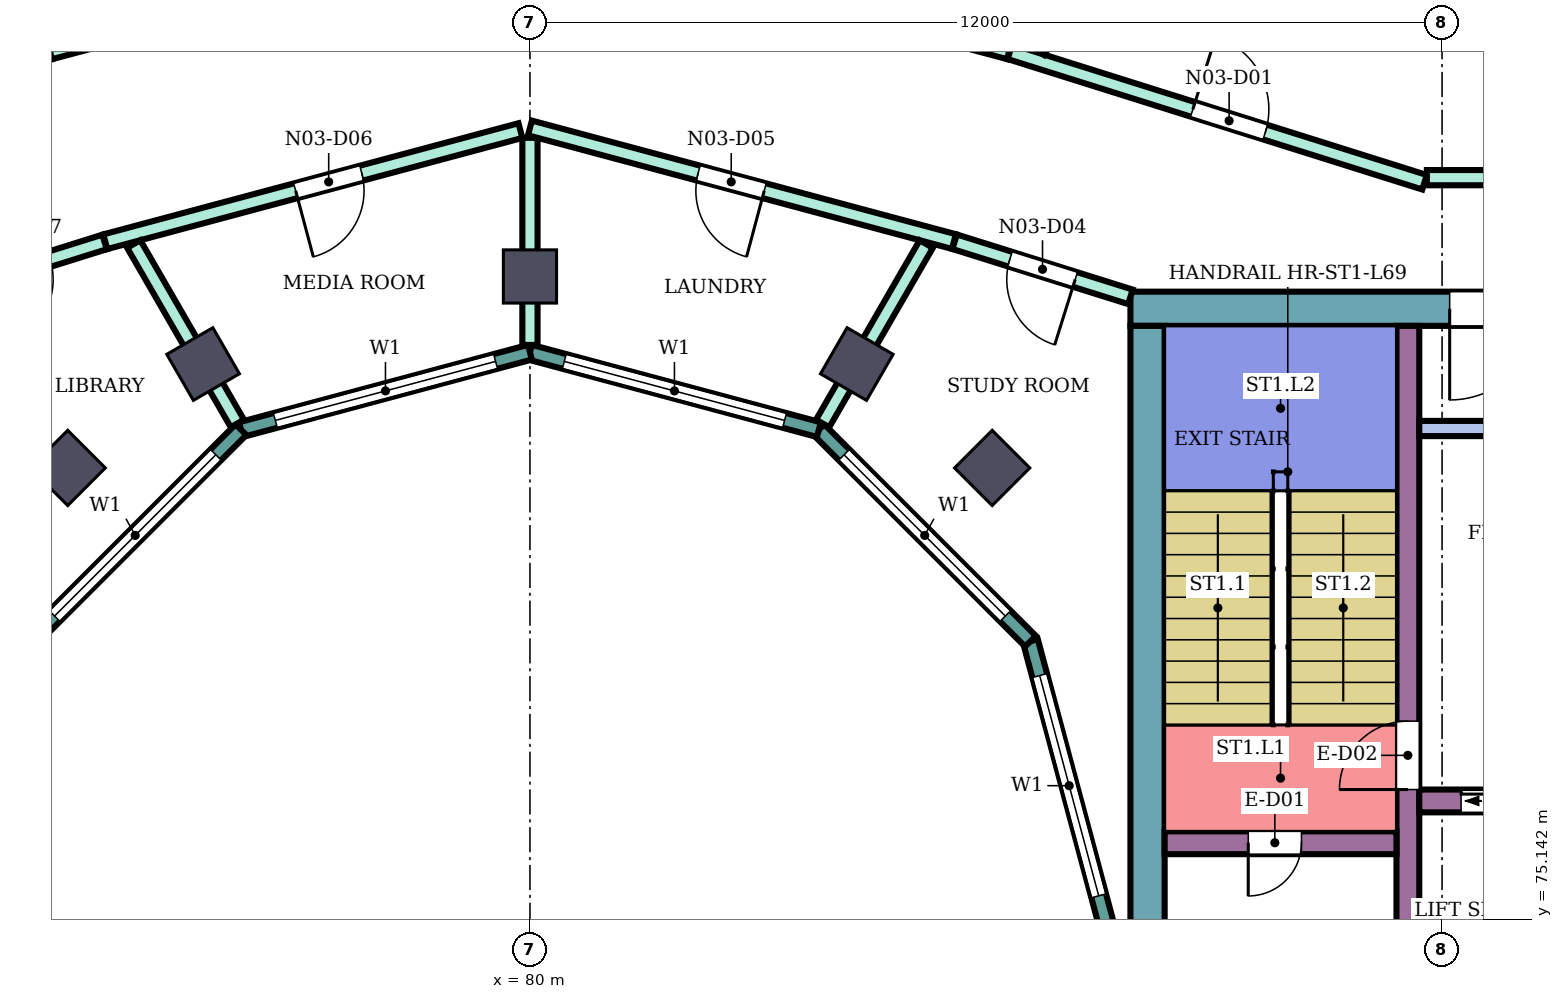
"""IFC4 building model, lengths in metres.
Left out: names, types, materials, properties, quantities, classifications, styles, units other than length and angle.
Written with IfcOpenShell. Run it as: python <this file> out.ifc"""

import sys

from ifc_helpers import new_model, si_unit, direction, frame, frame_2d, origin, origin_2d, place, context, subcontext, project, spatial, rectangle, extrude, element, fill, save


model = new_model("IFC4")
c1 = context("Model", 3, precision=1e-05, world=origin(), true_north=direction((0.0, 1.0)))
c2 = subcontext(c1, "Body", "Model", "MODEL_VIEW")
j1 = project(units=[si_unit("LENGTHUNIT", "METRE"), si_unit("PLANEANGLEUNIT", "RADIAN")], contexts=[c1])
p1 = place(None, origin())
s1 = spatial("IfcSite", under=j1, at=p1, CompositionType="ELEMENT")
p2 = place(p1, origin())
s2 = spatial("IfcBuilding", under=s1, at=p2, CompositionType="ELEMENT")
p3 = place(p2, frame((0.0, 0.0, 300.9)))
s3 = spatial("IfcBuildingStorey", under=s2, at=p3, CompositionType="ELEMENT", Elevation=300.9)
for number, where, z_axis, x_axis in (
    (1, (86.081, 81.081, 0.0), (0.0, 0.0, 1.0), (0.707, 0.707, 0.0)),
    (2, (84.3, 82.448, 0.0), (0.0, 0.0, 1.0), (0.5, 0.866, 0.0)),
    (3, (80.0, 83.6, 0.0), (0.0, 0.0, 1.0), (0.0, 1.0, 0.0)),
    (4, (75.7, 82.448, 0.0), (0.0, 0.0, 1.0), (-0.5, 0.866, 0.0)),
    (5, (73.919, 81.081, 0.0), (0.0, 0.0, 1.0), (-0.707, 0.707, 0.0)),
):
    element("IfcColumn", number, at=place(p3, frame(where, z_axis=z_axis, x_axis=x_axis)), inside=s3, PredefinedType="COLUMN", context=c2, shape_type="SweptSolid", body=[
        extrude(rectangle(XDim=0.7, YDim=0.7, at=origin_2d()), origin(), (0.0, 0.0, 1.0), 4.2),
    ])
p4 = place(p3, frame((87.9, 83.175, 0.0), z_axis=(0.0, 0.0, 1.0), x_axis=(1.0, 0.0, 0.0)))
e6 = element("IfcWall", 6, at=p4, inside=s3, PredefinedType="SHEAR", context=c2, shape_type="SweptSolid", body=[
    extrude(rectangle(XDim=12.0, YDim=0.45, at=frame_2d((6.0, 0.0))), origin(), (0.0, 0.0, 1.0), 3.88),
])
p5 = place(p4, frame((4.2, 0.0, 0.0)))
e7 = element("IfcOpeningElement", 7, at=p5, cuts=e6, PredefinedType="OPENING", context=c2, shape_type="SweptSolid", body=[
    extrude(rectangle(XDim=2.4, YDim=2.4, at=frame_2d((1.2, 1.2))), frame((0.0, 0.235, 0.0), z_axis=(0.0, -1.0, 0.0), x_axis=(1.0, 0.0, 0.0)), (0.0, 0.0, 1.0), 0.47),
])
p6 = place(p3, frame((88.125, 75.0, 0.0), z_axis=(0.0, 0.0, 1.0), x_axis=(0.0, 1.0, 0.0)))
e8 = element("IfcWall", 8, at=p6, inside=s3, PredefinedType="SHEAR", context=c2, shape_type="SweptSolid", body=[
    extrude(rectangle(XDim=7.95, YDim=0.45, at=frame_2d((3.975, 0.0))), origin(), (0.0, 0.0, 1.0), 3.88),
])
p7 = place(p3, frame((91.55, 75.0, 0.0), z_axis=(0.0, 0.0, 1.0), x_axis=(0.0, 1.0, 0.0)))
e9 = element("IfcWall", 9, at=p7, inside=s3, PredefinedType="SHEAR", context=c2, shape_type="SweptSolid", body=[
    extrude(rectangle(XDim=7.95, YDim=0.3, at=frame_2d((3.975, 0.0))), origin(), (0.0, 0.0, 1.0), 3.88),
])
p8 = place(p7, frame((1.85, 0.0, 0.0)))
e10 = element("IfcOpeningElement", 10, at=p8, cuts=e9, PredefinedType="OPENING", context=c2, shape_type="SweptSolid", body=[
    extrude(rectangle(XDim=0.9, YDim=2.1, at=frame_2d((0.45, 1.05))), frame((0.0, 0.16, 0.0), z_axis=(0.0, -1.0, 0.0), x_axis=(1.0, 0.0, 0.0)), (0.0, 0.0, 1.0), 0.32),
])
p9 = place(p3, frame((88.35, 76.15, 0.0), z_axis=(0.0, 0.0, 1.0), x_axis=(1.0, 0.0, 0.0)))
e11 = element("IfcWall", 11, at=p9, inside=s3, PredefinedType="SHEAR", context=c2, shape_type="SweptSolid", body=[
    extrude(rectangle(XDim=3.05, YDim=0.3, at=frame_2d((1.525, 0.0))), origin(), (0.0, 0.0, 1.0), 3.88),
])
p10 = place(p9, frame((1.1, 0.0, 0.0)))
e12 = element("IfcOpeningElement", 12, at=p10, cuts=e11, PredefinedType="OPENING", context=c2, shape_type="SweptSolid", body=[
    extrude(rectangle(XDim=0.7, YDim=2.0, at=frame_2d((0.35, 1.0))), frame((0.0, 0.16, 0.0), z_axis=(0.0, -1.0, 0.0), x_axis=(1.0, 0.0, 0.0)), (0.0, 0.0, 1.0), 0.32),
])
p11 = place(p3, frame((91.7, 76.7, 0.0), z_axis=(0.0, 0.0, 1.0), x_axis=(1.0, 0.0, 0.0)))
e13 = element("IfcWall", 13, at=p11, inside=s3, PredefinedType="SHEAR", context=c2, shape_type="SweptSolid", body=[
    extrude(rectangle(XDim=7.75, YDim=0.3, at=frame_2d((3.875, 0.0))), origin(), (0.0, 0.0, 1.0), 3.88),
])
p12 = place(p11, frame((0.55, 0.0, 0.0)))
e14 = element("IfcOpeningElement", 14, at=p12, cuts=e13, PredefinedType="OPENING", context=c2, shape_type="SweptSolid", body=[
    extrude(rectangle(XDim=1.1, YDim=2.1, at=frame_2d((0.55, 1.05))), frame((0.0, 0.16, 0.0), z_axis=(0.0, -1.0, 0.0), x_axis=(1.0, 0.0, 0.0)), (0.0, 0.0, 1.0), 0.32),
])
p13 = place(p11, frame((3.0, 0.0, 0.0)))
e15 = element("IfcOpeningElement", 15, at=p13, cuts=e13, PredefinedType="OPENING", context=c2, shape_type="SweptSolid", body=[
    extrude(rectangle(XDim=1.2, YDim=2.1, at=frame_2d((0.6, 1.05))), frame((0.0, 0.16, 0.0), z_axis=(0.0, -1.0, 0.0), x_axis=(1.0, 0.0, 0.0)), (0.0, 0.0, 1.0), 0.32),
])
p14 = place(p11, frame((5.5, 0.0, 0.0)))
e16 = element("IfcOpeningElement", 16, at=p14, cuts=e13, PredefinedType="OPENING", context=c2, shape_type="SweptSolid", body=[
    extrude(rectangle(XDim=1.2, YDim=2.1, at=frame_2d((0.6, 1.05))), frame((0.0, 0.16, 0.0), z_axis=(0.0, -1.0, 0.0), x_axis=(1.0, 0.0, 0.0)), (0.0, 0.0, 1.0), 0.32),
])
p15 = place(p3, frame((91.7, 81.6, 0.0), z_axis=(0.0, 0.0, 1.0), x_axis=(1.0, 0.0, 0.0)))
e17 = element("IfcWall", 17, at=p15, inside=s3, PredefinedType="SHEAR", context=c2, shape_type="SweptSolid", body=[
    extrude(rectangle(XDim=4.15, YDim=0.2, at=frame_2d((2.075, 0.0))), origin(), (0.0, 0.0, 1.0), 3.88),
])
p16 = place(p3, frame((87.604, 75.0, 0.0), z_axis=(0.0, 0.0, 1.0), x_axis=(-0.258789828301, 0.965933654434, 0.0)))
e18 = element("IfcWall", 18, at=p16, inside=s3, PredefinedType="NOTDEFINED", context=c2, shape_type="SweptSolid", body=[
    extrude(rectangle(XDim=3.936, YDim=0.2, at=frame_2d((1.968, 0.0))), origin(), (0.0, 0.0, 1.0), 4.2),
])
p17 = place(p16, frame((0.468, 0.0, 0.9)))
e19 = element("IfcOpeningElement", 19, at=p17, cuts=e18, PredefinedType="OPENING", context=c2, shape_type="SweptSolid", body=[
    extrude(rectangle(XDim=3.0, YDim=2.3, at=frame_2d((1.5, 1.15))), frame((0.0, 0.11, 0.0), z_axis=(0.0, -1.0, 0.0), x_axis=(1.0, 0.0, 0.0)), (0.0, 0.0, 1.0), 0.22),
])
p18 = place(p3, frame((86.585, 78.802, 0.0), z_axis=(0.0, 0.0, 1.0), x_axis=(-0.707106781187, 0.707106781187, 0.0)))
e20 = element("IfcWall", 20, at=p18, inside=s3, PredefinedType="NOTDEFINED", context=c2, shape_type="SweptSolid", body=[
    extrude(rectangle(XDim=3.936, YDim=0.2, at=frame_2d((1.968, 0.0))), origin(), (0.0, 0.0, 1.0), 4.2),
])
p19 = place(p18, frame((0.468, 0.0, 0.9)))
e21 = element("IfcOpeningElement", 21, at=p19, cuts=e20, PredefinedType="OPENING", context=c2, shape_type="SweptSolid", body=[
    extrude(rectangle(XDim=3.0, YDim=2.3, at=frame_2d((1.5, 1.15))), frame((0.0, 0.11, 0.0), z_axis=(0.0, -1.0, 0.0), x_axis=(1.0, 0.0, 0.0)), (0.0, 0.0, 1.0), 0.22),
])
p20 = place(p3, frame((83.802, 81.585, 0.0), z_axis=(0.0, 0.0, 1.0), x_axis=(-0.965933654434, 0.258789828301, 0.0)))
e22 = element("IfcWall", 22, at=p20, inside=s3, PredefinedType="NOTDEFINED", context=c2, shape_type="SweptSolid", body=[
    extrude(rectangle(XDim=3.936, YDim=0.2, at=frame_2d((1.968, 0.0))), origin(), (0.0, 0.0, 1.0), 4.2),
])
p21 = place(p20, frame((0.468, 0.0, 0.9)))
e23 = element("IfcOpeningElement", 23, at=p21, cuts=e22, PredefinedType="OPENING", context=c2, shape_type="SweptSolid", body=[
    extrude(rectangle(XDim=3.0, YDim=2.3, at=frame_2d((1.5, 1.15))), frame((0.0, 0.11, 0.0), z_axis=(0.0, -1.0, 0.0), x_axis=(1.0, 0.0, 0.0)), (0.0, 0.0, 1.0), 0.22),
])
p22 = place(p3, frame((80.0, 82.604, 0.0), z_axis=(0.0, 0.0, 1.0), x_axis=(-0.965933654434, -0.258789828301, 0.0)))
e24 = element("IfcWall", 24, at=p22, inside=s3, PredefinedType="NOTDEFINED", context=c2, shape_type="SweptSolid", body=[
    extrude(rectangle(XDim=3.936, YDim=0.2, at=frame_2d((1.968, 0.0))), origin(), (0.0, 0.0, 1.0), 4.2),
])
p23 = place(p22, frame((0.468, 0.0, 0.9)))
e25 = element("IfcOpeningElement", 25, at=p23, cuts=e24, PredefinedType="OPENING", context=c2, shape_type="SweptSolid", body=[
    extrude(rectangle(XDim=3.0, YDim=2.3, at=frame_2d((1.5, 1.15))), frame((0.0, 0.11, 0.0), z_axis=(0.0, -1.0, 0.0), x_axis=(1.0, 0.0, 0.0)), (0.0, 0.0, 1.0), 0.22),
])
p24 = place(p3, frame((76.198, 81.585, 0.0), z_axis=(0.0, 0.0, 1.0), x_axis=(-0.707106781187, -0.707106781187, 0.0)))
e26 = element("IfcWall", 26, at=p24, inside=s3, PredefinedType="NOTDEFINED", context=c2, shape_type="SweptSolid", body=[
    extrude(rectangle(XDim=3.936, YDim=0.2, at=frame_2d((1.968, 0.0))), origin(), (0.0, 0.0, 1.0), 4.2),
])
p25 = place(p24, frame((0.468, 0.0, 0.9)))
e27 = element("IfcOpeningElement", 27, at=p25, cuts=e26, PredefinedType="OPENING", context=c2, shape_type="SweptSolid", body=[
    extrude(rectangle(XDim=3.0, YDim=2.3, at=frame_2d((1.5, 1.15))), frame((0.0, 0.11, 0.0), z_axis=(0.0, -1.0, 0.0), x_axis=(1.0, 0.0, 0.0)), (0.0, 0.0, 1.0), 0.22),
])
p26 = place(p3, frame((72.1, 83.332, 0.0), z_axis=(0.0, 0.0, 1.0), x_axis=(0.954233106619, 0.299063836383, 0.0)))
e28 = element("IfcWall", 28, at=p26, inside=s3, PredefinedType="PARTITIONING", context=c2, shape_type="SweptSolid", body=[
    extrude(rectangle(XDim=2.414, YDim=0.2, at=frame_2d((1.207, 0.0))), origin(), (0.0, 0.0, 1.0), 3.75),
])
p27 = place(p26, frame((0.762, 0.0, 0.0)))
e29 = element("IfcOpeningElement", 29, at=p27, cuts=e28, PredefinedType="OPENING", context=c2, shape_type="SweptSolid", body=[
    extrude(rectangle(XDim=0.9, YDim=2.1, at=frame_2d((0.45, 1.05))), frame((0.0, 0.11, 0.0), z_axis=(0.0, -1.0, 0.0), x_axis=(1.0, 0.0, 0.0)), (0.0, 0.0, 1.0), 0.22),
])
p28 = place(p3, frame((73.687, 86.555, 0.0), z_axis=(0.0, 0.0, 1.0), x_axis=(0.965987897826, 0.258587279759, 0.0)))
e30 = element("IfcWall", 30, at=p28, inside=s3, PredefinedType="PARTITIONING", context=c2, shape_type="SweptSolid", body=[
    extrude(rectangle(XDim=3.007, YDim=0.2, at=frame_2d((1.503, 0.0))), origin(), (0.0, 0.0, 1.0), 3.75),
])
p29 = place(p3, frame((74.413, 84.057, 0.0), z_axis=(0.0, 0.0, 1.0), x_axis=(0.965972135939, 0.258646153246, 0.0)))
e31 = element("IfcWall", 31, at=p29, inside=s3, PredefinedType="PARTITIONING", context=c2, shape_type="SweptSolid", body=[
    extrude(rectangle(XDim=5.654, YDim=0.2, at=frame_2d((2.827, 0.0))), origin(), (0.0, 0.0, 1.0), 3.75),
])
p30 = place(p29, frame((2.593, 0.0, 0.0)))
e32 = element("IfcOpeningElement", 32, at=p30, cuts=e31, PredefinedType="OPENING", context=c2, shape_type="SweptSolid", body=[
    extrude(rectangle(XDim=0.9, YDim=2.1, at=frame_2d((0.45, 1.05))), frame((0.0, 0.11, 0.0), z_axis=(0.0, -1.0, 0.0), x_axis=(1.0, 0.0, 0.0)), (0.0, 0.0, 1.0), 0.22),
])
p31 = place(p3, frame((74.787, 84.027, 0.0), z_axis=(0.0, 0.0, 1.0), x_axis=(0.500079107518, -0.86597972622, 0.0)))
e33 = element("IfcWall", 33, at=p31, inside=s3, PredefinedType="PARTITIONING", context=c2, shape_type="SweptSolid", body=[
    extrude(rectangle(XDim=2.726, YDim=0.2, at=frame_2d((1.363, 0.0))), origin(), (0.0, 0.0, 1.0), 3.75),
])
p32 = place(p3, frame((80.0, 82.699, 0.0), z_axis=(0.0, 0.0, 1.0), x_axis=(0.0, 1.0, 0.0)))
e34 = element("IfcWall", 34, at=p32, inside=s3, PredefinedType="PARTITIONING", context=c2, shape_type="SweptSolid", body=[
    extrude(rectangle(XDim=2.725, YDim=0.2, at=frame_2d((1.363, 0.0))), origin(), (0.0, 0.0, 1.0), 3.75),
])
p33 = place(p3, frame((80.0, 85.554, 0.0), z_axis=(0.0, 0.0, 1.0), x_axis=(0.965928989968, -0.258807237802, 0.0)))
e35 = element("IfcWall", 35, at=p33, inside=s3, PredefinedType="PARTITIONING", context=c2, shape_type="SweptSolid", body=[
    extrude(rectangle(XDim=5.774, YDim=0.2, at=frame_2d((2.887, 0.0))), origin(), (0.0, 0.0, 1.0), 3.75),
])
p34 = place(p33, frame((2.292, 0.0, 0.0)))
e36 = element("IfcOpeningElement", 36, at=p34, cuts=e35, PredefinedType="OPENING", context=c2, shape_type="SweptSolid", body=[
    extrude(rectangle(XDim=0.9, YDim=2.1, at=frame_2d((0.45, 1.05))), frame((0.0, 0.11, 0.0), z_axis=(0.0, -1.0, 0.0), x_axis=(1.0, 0.0, 0.0)), (0.0, 0.0, 1.0), 0.22),
])
p35 = place(p3, frame((80.0, 88.246, 0.0), z_axis=(0.0, 0.0, 1.0), x_axis=(0.965856994925, -0.259075790752, 0.0)))
e37 = element("IfcWall", 37, at=p35, inside=s3, PredefinedType="PARTITIONING", context=c2, shape_type="SweptSolid", body=[
    extrude(rectangle(XDim=6.526, YDim=0.2, at=frame_2d((3.263, 0.0))), origin(), (0.0, 0.0, 1.0), 3.75),
])
p36 = place(p35, frame((2.768, 0.0, 0.0)))
e38 = element("IfcOpeningElement", 38, at=p36, cuts=e37, PredefinedType="OPENING", context=c2, shape_type="SweptSolid", body=[
    extrude(rectangle(XDim=1.0, YDim=2.1, at=frame_2d((0.5, 1.05))), frame((0.0, 0.11, 0.0), z_axis=(0.0, -1.0, 0.0), x_axis=(1.0, 0.0, 0.0)), (0.0, 0.0, 1.0), 0.22),
])
p37 = place(p3, frame((83.851, 81.666, 0.0), z_axis=(0.0, 0.0, 1.0), x_axis=(0.500146274735, 0.865940935554, 0.0)))
e39 = element("IfcWall", 39, at=p37, inside=s3, PredefinedType="PARTITIONING", context=c2, shape_type="SweptSolid", body=[
    extrude(rectangle(XDim=2.726, YDim=0.2, at=frame_2d((1.363, 0.0))), origin(), (0.0, 0.0, 1.0), 3.75),
])
p38 = place(p3, frame((85.587, 84.057, 0.0), z_axis=(0.0, 0.0, 1.0), x_axis=(0.954239513179, -0.299043393987, 0.0)))
e40 = element("IfcWall", 40, at=p38, inside=s3, PredefinedType="PARTITIONING", context=c2, shape_type="SweptSolid", body=[
    extrude(rectangle(XDim=2.424, YDim=0.2, at=frame_2d((1.212, 0.0))), origin(), (0.0, 0.0, 1.0), 3.75),
])
p39 = place(p38, frame((0.762, 0.0, 0.0)))
e41 = element("IfcOpeningElement", 41, at=p39, cuts=e40, PredefinedType="OPENING", context=c2, shape_type="SweptSolid", body=[
    extrude(rectangle(XDim=0.9, YDim=2.1, at=frame_2d((0.45, 1.05))), frame((0.0, 0.11, 0.0), z_axis=(0.0, -1.0, 0.0), x_axis=(1.0, 0.0, 0.0)), (0.0, 0.0, 1.0), 0.22),
])
p40 = place(p3, frame((86.314, 86.556, 0.0), z_axis=(0.0, 0.0, 1.0), x_axis=(0.953912400139, -0.300085209334, 0.0)))
e42 = element("IfcWall", 42, at=p40, inside=s3, PredefinedType="PARTITIONING", context=c2, shape_type="SweptSolid", body=[
    extrude(rectangle(XDim=5.719, YDim=0.2, at=frame_2d((2.86, 0.0))), origin(), (0.0, 0.0, 1.0), 3.75),
])
p41 = place(p40, frame((2.524, 0.0, 0.0)))
e43 = element("IfcOpeningElement", 43, at=p41, cuts=e42, PredefinedType="OPENING", context=c2, shape_type="SweptSolid", body=[
    extrude(rectangle(XDim=1.0, YDim=2.1, at=frame_2d((0.5, 1.05))), frame((0.0, 0.11, 0.0), z_axis=(0.0, -1.0, 0.0), x_axis=(1.0, 0.0, 0.0)), (0.0, 0.0, 1.0), 0.22),
])
p42 = place(p3, frame((86.679, 86.563, 0.0), z_axis=(0.0, 0.0, 1.0), x_axis=(0.500152516677, 0.865937330331, 0.0)))
e44 = element("IfcWall", 44, at=p42, inside=s3, PredefinedType="PARTITIONING", context=c2, shape_type="SweptSolid", body=[
    extrude(rectangle(XDim=8.943, YDim=0.2, at=frame_2d((4.472, 0.0))), origin(), (0.0, 0.0, 1.0), 3.75),
])
p43 = place(p3, frame((91.8, 84.9, 0.0), z_axis=(0.0, 0.0, 1.0), x_axis=(1.0, 0.0, 0.0)))
e45 = element("IfcWall", 45, at=p43, inside=s3, PredefinedType="PARTITIONING", context=c2, shape_type="SweptSolid", body=[
    extrude(rectangle(XDim=2.9, YDim=0.2, at=frame_2d((1.45, 0.0))), origin(), (0.0, 0.0, 1.0), 3.75),
])
p44 = place(p17, origin())
e46 = element("IfcWindow", 46, at=p44, inside=s3, PartitioningType="SINGLE_PANEL", PredefinedType="WINDOW", context=c2, shape_type="SweptSolid", body=[
    extrude(rectangle(XDim=3.0, YDim=2.3, at=frame_2d((1.5, 1.15))), frame((0.0, 0.03, 0.0), z_axis=(0.0, -1.0, 0.0), x_axis=(1.0, 0.0, 0.0)), (0.0, 0.0, 1.0), 0.06),
])
fill(e19, e46)
p45 = place(p19, origin())
e47 = element("IfcWindow", 47, at=p45, inside=s3, PartitioningType="SINGLE_PANEL", PredefinedType="WINDOW", context=c2, shape_type="SweptSolid", body=[
    extrude(rectangle(XDim=3.0, YDim=2.3, at=frame_2d((1.5, 1.15))), frame((0.0, 0.03, 0.0), z_axis=(0.0, -1.0, 0.0), x_axis=(1.0, 0.0, 0.0)), (0.0, 0.0, 1.0), 0.06),
])
fill(e21, e47)
p46 = place(p21, origin())
e48 = element("IfcWindow", 48, at=p46, inside=s3, PartitioningType="SINGLE_PANEL", PredefinedType="WINDOW", context=c2, shape_type="SweptSolid", body=[
    extrude(rectangle(XDim=3.0, YDim=2.3, at=frame_2d((1.5, 1.15))), frame((0.0, 0.03, 0.0), z_axis=(0.0, -1.0, 0.0), x_axis=(1.0, 0.0, 0.0)), (0.0, 0.0, 1.0), 0.06),
])
fill(e23, e48)
p47 = place(p23, origin())
e49 = element("IfcWindow", 49, at=p47, inside=s3, PartitioningType="SINGLE_PANEL", PredefinedType="WINDOW", context=c2, shape_type="SweptSolid", body=[
    extrude(rectangle(XDim=3.0, YDim=2.3, at=frame_2d((1.5, 1.15))), frame((0.0, 0.03, 0.0), z_axis=(0.0, -1.0, 0.0), x_axis=(1.0, 0.0, 0.0)), (0.0, 0.0, 1.0), 0.06),
])
fill(e25, e49)
p48 = place(p25, origin())
e50 = element("IfcWindow", 50, at=p48, inside=s3, PartitioningType="SINGLE_PANEL", PredefinedType="WINDOW", context=c2, shape_type="SweptSolid", body=[
    extrude(rectangle(XDim=3.0, YDim=2.3, at=frame_2d((1.5, 1.15))), frame((0.0, 0.03, 0.0), z_axis=(0.0, -1.0, 0.0), x_axis=(1.0, 0.0, 0.0)), (0.0, 0.0, 1.0), 0.06),
])
fill(e27, e50)
p49 = place(p41, origin())
e51 = element("IfcDoor", 51, at=p49, inside=s3, OperationType="SINGLE_SWING_LEFT", PredefinedType="DOOR", context=c2, shape_type="SweptSolid", body=[
    extrude(rectangle(XDim=1.0, YDim=2.1, at=frame_2d((0.5, 1.05))), frame((0.0, 0.025, 0.0), z_axis=(0.0, -1.0, 0.0), x_axis=(1.0, 0.0, 0.0)), (0.0, 0.0, 1.0), 0.05),
])
fill(e43, e51)
p50 = place(p39, frame((0.9, 0.0, 0.0), z_axis=(0.0, 0.0, 1.0), x_axis=(-1.0, 0.0, 0.0)))
e52 = element("IfcDoor", 52, at=p50, inside=s3, OperationType="SINGLE_SWING_LEFT", PredefinedType="DOOR", context=c2, shape_type="SweptSolid", body=[
    extrude(rectangle(XDim=0.9, YDim=2.1, at=frame_2d((0.45, 1.05))), frame((0.0, 0.025, 0.0), z_axis=(0.0, -1.0, 0.0), x_axis=(1.0, 0.0, 0.0)), (0.0, 0.0, 1.0), 0.05),
])
fill(e41, e52)
p51 = place(p34, frame((0.9, 0.0, 0.0), z_axis=(0.0, 0.0, 1.0), x_axis=(-1.0, 0.0, 0.0)))
e53 = element("IfcDoor", 53, at=p51, inside=s3, OperationType="SINGLE_SWING_LEFT", PredefinedType="DOOR", context=c2, shape_type="SweptSolid", body=[
    extrude(rectangle(XDim=0.9, YDim=2.1, at=frame_2d((0.45, 1.05))), frame((0.0, 0.025, 0.0), z_axis=(0.0, -1.0, 0.0), x_axis=(1.0, 0.0, 0.0)), (0.0, 0.0, 1.0), 0.05),
])
fill(e36, e53)
p52 = place(p30, frame((0.9, 0.0, 0.0), z_axis=(0.0, 0.0, 1.0), x_axis=(-1.0, 0.0, 0.0)))
e54 = element("IfcDoor", 54, at=p52, inside=s3, OperationType="SINGLE_SWING_RIGHT", PredefinedType="DOOR", context=c2, shape_type="SweptSolid", body=[
    extrude(rectangle(XDim=0.9, YDim=2.1, at=frame_2d((0.45, 1.05))), frame((0.0, 0.025, 0.0), z_axis=(0.0, -1.0, 0.0), x_axis=(1.0, 0.0, 0.0)), (0.0, 0.0, 1.0), 0.05),
])
fill(e32, e54)
p53 = place(p10, frame((0.7, 0.0, 0.0), z_axis=(0.0, 0.0, 1.0), x_axis=(-1.0, 0.0, 0.0)))
e55 = element("IfcDoor", 55, at=p53, inside=s3, OperationType="SINGLE_SWING_RIGHT", PredefinedType="DOOR", context=c2, shape_type="SweptSolid", body=[
    extrude(rectangle(XDim=0.7, YDim=2.0, at=frame_2d((0.35, 1.0))), frame((0.0, 0.025, 0.0), z_axis=(0.0, -1.0, 0.0), x_axis=(1.0, 0.0, 0.0)), (0.0, 0.0, 1.0), 0.05),
])
fill(e12, e55)
p54 = place(p8, origin())
e56 = element("IfcDoor", 56, at=p54, inside=s3, OperationType="SINGLE_SWING_LEFT", PredefinedType="DOOR", context=c2, shape_type="SweptSolid", body=[
    extrude(rectangle(XDim=0.9, YDim=2.1, at=frame_2d((0.45, 1.05))), frame((0.0, 0.025, 0.0), z_axis=(0.0, -1.0, 0.0), x_axis=(1.0, 0.0, 0.0)), (0.0, 0.0, 1.0), 0.05),
])
fill(e10, e56)
p55 = place(p12, origin())
e57 = element("IfcDoor", 57, at=p55, inside=s3, OperationType="DOUBLE_DOOR_SLIDING", PredefinedType="DOOR", context=c2, shape_type="SweptSolid", body=[
    extrude(rectangle(XDim=1.1, YDim=2.1, at=frame_2d((0.55, 1.05))), frame((0.0, 0.025, 0.0), z_axis=(0.0, -1.0, 0.0), x_axis=(1.0, 0.0, 0.0)), (0.0, 0.0, 1.0), 0.05),
])
fill(e14, e57)
p56 = place(p5, frame((2.4, 0.0, 0.0), z_axis=(0.0, 0.0, 1.0), x_axis=(-1.0, 0.0, 0.0)))
e58 = element("IfcDoor", 58, at=p56, inside=s3, OperationType="DOUBLE_DOOR_SINGLE_SWING", PredefinedType="DOOR", context=c2, shape_type="SweptSolid", body=[
    extrude(rectangle(XDim=2.4, YDim=2.4, at=frame_2d((1.2, 1.2))), frame((0.0, 0.025, 0.0), z_axis=(0.0, -1.0, 0.0), x_axis=(1.0, 0.0, 0.0)), (0.0, 0.0, 1.0), 0.05),
])
fill(e7, e58)
save(model, sys.argv[1])
